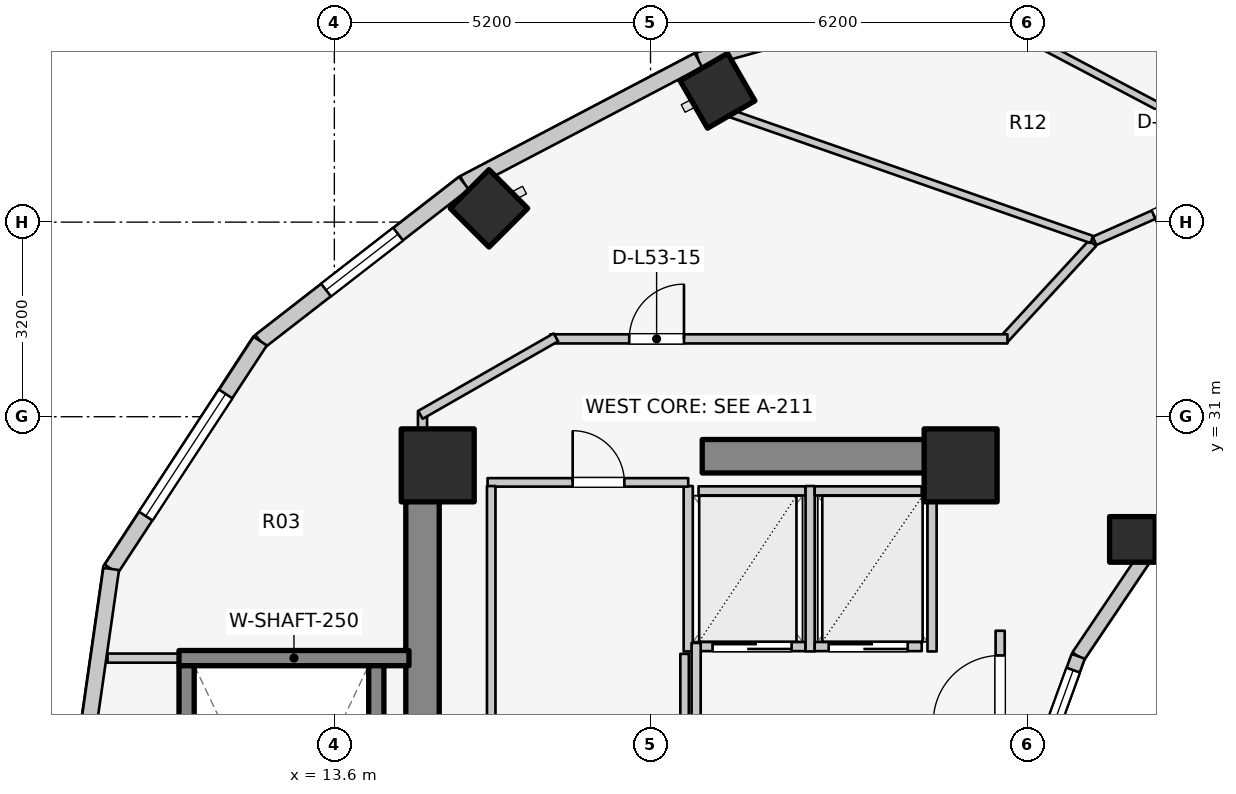
"""IFC4 building model, lengths in metres.
Left out: names, types, materials, properties, quantities, classifications, styles, units other than length and angle.
Written with IfcOpenShell. Run it as: python <this file> out.ifc"""

import sys

from ifc_helpers import new_model, si_unit, direction, frame, frame_2d, origin, origin_2d, place, context, subcontext, project, spatial, rectangle, extrude, element, fill, save


model = new_model("IFC4")
c1 = context("Model", 3, precision=1e-05, world=origin(), true_north=direction((0.0, 1.0)))
c2 = subcontext(c1, "Body", "Model", "MODEL_VIEW")
j1 = project(units=[si_unit("LENGTHUNIT", "METRE"), si_unit("PLANEANGLEUNIT", "RADIAN")], contexts=[c1])
p1 = place(None, origin())
s1 = spatial("IfcSite", under=j1, at=p1, CompositionType="ELEMENT")
p2 = place(p1, origin())
s2 = spatial("IfcBuilding", under=s1, at=p2, CompositionType="ELEMENT")
p3 = place(p2, frame((0.0, 0.0, 174.6)))
s3 = spatial("IfcBuildingStorey", under=s2, at=p3, CompositionType="ELEMENT", Elevation=174.6)
p4 = place(p3, frame((15.05, 17.05, 0.0), z_axis=(0.0, 0.0, 1.0), x_axis=(0.0, 1.0, 0.0)))
e1 = element("IfcWall", 1, at=p4, inside=s3, PredefinedType="SHEAR", context=c2, shape_type="SweptSolid", body=[
    extrude(rectangle(XDim=12.8, YDim=0.55, at=frame_2d((6.4, 0.0))), origin(), (0.0, 0.0, 1.0), 3.1),
])
p5 = place(p3, frame((19.65, 30.35, 0.0), z_axis=(0.0, 0.0, 1.0), x_axis=(1.0, 0.0, 0.0)))
e2 = element("IfcWall", 2, at=p5, inside=s3, PredefinedType="SHEAR", context=c2, shape_type="SweptSolid", body=[
    extrude(rectangle(XDim=4.5, YDim=0.55, at=frame_2d((2.25, 0.0))), origin(), (0.0, 0.0, 1.0), 3.1),
])
p6 = place(p3, frame((11.045, 27.03, 0.0), z_axis=(0.0, 0.0, 1.0), x_axis=(1.0, 0.0, 0.0)))
e3 = element("IfcWall", 3, at=p6, inside=s3, PredefinedType="SOLIDWALL", context=c2, shape_type="SweptSolid", body=[
    extrude(rectangle(XDim=3.782, YDim=0.25, at=frame_2d((1.891, 0.0))), origin(), (0.0, 0.0, 1.0), 3.1),
])
for number, where, z_axis, x_axis in (
    (4, (11.17, 19.095, 0.0), (0.0, 0.0, 1.0), (0.0, 1.0, 0.0)),
    (5, (14.29, 19.095, 0.0), (0.0, 0.0, 1.0), (0.0, 1.0, 0.0)),
):
    element("IfcWall", number, at=place(p3, frame(where, z_axis=z_axis, x_axis=x_axis)), inside=s3, PredefinedType="SOLIDWALL", context=c2, shape_type="SweptSolid", body=[
        extrude(rectangle(XDim=7.81, YDim=0.25, at=frame_2d((3.905, 0.0))), origin(), (0.0, 0.0, 1.0), 3.1),
    ])
for number, where, z_axis, x_axis in (
    (6, (23.9, 30.2, 0.0), (0.0, 0.0, 1.0), (1.0, 0.0, 0.0)),
    (7, (15.3, 30.2, 0.0), (0.0, 0.0, 1.0), (1.0, 0.0, 0.0)),
):
    element("IfcColumn", number, at=place(p3, frame(where, z_axis=z_axis, x_axis=x_axis)), inside=s3, PredefinedType="COLUMN", context=c2, shape_type="SweptSolid", body=[
        extrude(rectangle(XDim=1.2, YDim=1.2, at=origin_2d()), origin(), (0.0, 0.0, 1.0), 3.1),
    ])
p7 = place(p3, frame((19.902, 36.359, 0.0), z_axis=(0.0, 0.0, 1.0), x_axis=(-0.5, 0.866025403784, 0.0)))
e8 = element("IfcColumn", 8, at=p7, inside=s3, PredefinedType="COLUMN", context=c2, shape_type="SweptSolid", body=[
    extrude(rectangle(XDim=0.9, YDim=0.9, at=origin_2d()), origin(), (0.0, 0.0, 1.0), 3.1),
])
p8 = place(p3, frame((26.725, 28.982, 0.0), z_axis=(0.0, 0.0, 1.0), x_axis=(1.0, 0.0, 0.0)))
e9 = element("IfcColumn", 9, at=p8, inside=s3, PredefinedType="COLUMN", context=c2, shape_type="SweptSolid", body=[
    extrude(rectangle(XDim=0.75, YDim=0.75, at=origin_2d()), origin(), (0.0, 0.0, 1.0), 3.1),
])
p9 = place(p3, frame((16.143, 34.427, 0.0), z_axis=(0.0, 0.0, 1.0), x_axis=(-0.707106781187, 0.707106781187, 0.0)))
e10 = element("IfcColumn", 10, at=p9, inside=s3, PredefinedType="COLUMN", context=c2, shape_type="SweptSolid", body=[
    extrude(rectangle(XDim=0.9, YDim=0.9, at=origin_2d()), origin(), (0.0, 0.0, 1.0), 3.1),
])
p10 = place(p3, frame((28.44, 30.032, 0.0), z_axis=(0.0, 0.0, 1.0), x_axis=(-0.752576694707, -0.658504607869, 0.0)))
e11 = element("IfcWall", 11, at=p10, inside=s3, PredefinedType="STANDARD", context=c2, shape_type="SweptSolid", body=[
    extrude(rectangle(XDim=1.959, YDim=0.23, at=frame_2d((0.98, 0.0))), origin(), (0.0, 0.0, 1.0), 2.16),
])
p11 = place(p3, frame((26.965, 28.742, 0.0), z_axis=(0.0, 0.0, 1.0), x_axis=(-0.558197800898, -0.829707909492, 0.0)))
e12 = element("IfcWall", 12, at=p11, inside=s3, PredefinedType="STANDARD", context=c2, shape_type="SweptSolid", body=[
    extrude(rectangle(XDim=2.027, YDim=0.23, at=frame_2d((1.013, 0.0))), origin(), (0.0, 0.0, 1.0), 2.16),
])
p12 = place(p3, frame((25.834, 27.06, 0.0), z_axis=(0.0, 0.0, 1.0), x_axis=(-0.341423187295, -0.93990968033, 0.0)))
e13 = element("IfcWall", 13, at=p12, inside=s3, PredefinedType="STANDARD", context=c2, shape_type="SweptSolid", body=[
    extrude(rectangle(XDim=2.084, YDim=0.23, at=frame_2d((1.042, 0.0))), origin(), (0.0, 0.0, 1.0), 2.84),
])
p13 = place(p12, frame((0.242, 0.0, 0.85)))
e14 = element("IfcOpeningElement", 14, at=p13, cuts=e13, PredefinedType="OPENING", context=c2, shape_type="SweptSolid", body=[
    extrude(rectangle(XDim=1.6, YDim=1.65, at=frame_2d((0.8, 0.825))), frame((0.0, 0.125, 0.0), z_axis=(0.0, -1.0, 0.0), x_axis=(1.0, 0.0, 0.0)), (0.0, 0.0, 1.0), 0.25),
])
p14 = place(p3, frame((24.635, 38.257, 0.0), z_axis=(0.0, 0.0, 1.0), x_axis=(-0.963953455704, -0.26607092144, 0.0)))
e15 = element("IfcWall", 15, at=p14, inside=s3, PredefinedType="STANDARD", context=c2, shape_type="SweptSolid", body=[
    extrude(rectangle(XDim=5.237, YDim=0.26, at=frame_2d((2.618, 0.0))), origin(), (0.0, 0.0, 1.0), 2.85),
])
p15 = place(p14, frame((1.418, 0.0, 0.75)))
e16 = element("IfcOpeningElement", 16, at=p15, cuts=e15, PredefinedType="OPENING", context=c2, shape_type="SweptSolid", body=[
    extrude(rectangle(XDim=2.4, YDim=1.7, at=frame_2d((1.2, 0.85))), frame((0.0, 0.14, 0.0), z_axis=(0.0, -1.0, 0.0), x_axis=(1.0, 0.0, 0.0)), (0.0, 0.0, 1.0), 0.28),
])
p16 = place(p3, frame((19.587, 36.863, 0.0), z_axis=(0.0, 0.0, 1.0), x_axis=(-0.885660265226, -0.464333818065, 0.0)))
e17 = element("IfcWall", 17, at=p16, inside=s3, PredefinedType="STANDARD", context=c2, shape_type="SweptSolid", body=[
    extrude(rectangle(XDim=4.354, YDim=0.26, at=frame_2d((2.177, 0.0))), origin(), (0.0, 0.0, 1.0), 2.85),
])
p17 = place(p3, frame((15.731, 34.842, 0.0), z_axis=(0.0, 0.0, 1.0), x_axis=(-0.790185650662, -0.612867552973, 0.0)))
e18 = element("IfcWall", 18, at=p17, inside=s3, PredefinedType="STANDARD", context=c2, shape_type="SweptSolid", body=[
    extrude(rectangle(XDim=4.239, YDim=0.26, at=frame_2d((2.12, 0.0))), origin(), (0.0, 0.0, 1.0), 2.85),
])
p18 = place(p17, frame((1.37, 0.0, 0.75)))
e19 = element("IfcOpeningElement", 19, at=p18, cuts=e18, PredefinedType="OPENING", context=c2, shape_type="SweptSolid", body=[
    extrude(rectangle(XDim=1.5, YDim=1.6, at=frame_2d((0.75, 0.8))), frame((0.0, 0.14, 0.0), z_axis=(0.0, -1.0, 0.0), x_axis=(1.0, 0.0, 0.0)), (0.0, 0.0, 1.0), 0.28),
])
p19 = place(p3, frame((12.381, 32.243, 0.0), z_axis=(0.0, 0.0, 1.0), x_axis=(-0.547456494366, -0.836834145322, 0.0)))
e20 = element("IfcWall", 20, at=p19, inside=s3, PredefinedType="STANDARD", context=c2, shape_type="SweptSolid", body=[
    extrude(rectangle(XDim=4.477, YDim=0.26, at=frame_2d((2.239, 0.0))), origin(), (0.0, 0.0, 1.0), 2.85),
])
p20 = place(p19, frame((1.039, 0.0, 0.75)))
e21 = element("IfcOpeningElement", 21, at=p20, cuts=e20, PredefinedType="OPENING", context=c2, shape_type="SweptSolid", body=[
    extrude(rectangle(XDim=2.4, YDim=1.7, at=frame_2d((1.2, 0.85))), frame((0.0, 0.14, 0.0), z_axis=(0.0, -1.0, 0.0), x_axis=(1.0, 0.0, 0.0)), (0.0, 0.0, 1.0), 0.28),
])
p21 = place(p3, frame((9.93, 28.497, 0.0), z_axis=(0.0, 0.0, 1.0), x_axis=(-0.142227632286, -0.989833976288, 0.0)))
e22 = element("IfcWall", 22, at=p21, inside=s3, PredefinedType="STANDARD", context=c2, shape_type="SweptSolid", body=[
    extrude(rectangle(XDim=5.553, YDim=0.26, at=frame_2d((2.776, 0.0))), origin(), (0.0, 0.0, 1.0), 2.85),
])
p22 = place(p21, frame((2.892, 0.0, 0.75)))
e23 = element("IfcOpeningElement", 23, at=p22, cuts=e22, PredefinedType="OPENING", context=c2, shape_type="SweptSolid", body=[
    extrude(rectangle(XDim=1.2, YDim=1.5, at=frame_2d((0.6, 0.75))), frame((0.0, 0.14, 0.0), z_axis=(0.0, -1.0, 0.0), x_axis=(1.0, 0.0, 0.0)), (0.0, 0.0, 1.0), 0.28),
])
p23 = place(p3, frame((19.59, 27.22, 0.0), z_axis=(0.0, 0.0, 1.0), x_axis=(1.0, 0.0, 0.0)))
e24 = element("IfcWall", 24, at=p23, inside=s3, PredefinedType="SOLIDWALL", context=c2, shape_type="SweptSolid", body=[
    extrude(rectangle(XDim=1.76, YDim=0.15, at=frame_2d((0.88, 0.0))), origin(), (0.0, 0.0, 1.0), 2.855),
])
p24 = place(p23, frame((0.23, 0.0, 0.0)))
e25 = element("IfcOpeningElement", 25, at=p24, cuts=e24, PredefinedType="OPENING", context=c2, shape_type="SweptSolid", body=[
    extrude(rectangle(XDim=1.3, YDim=2.1, at=frame_2d((0.65, 1.05))), frame((0.0, 0.085, 0.0), z_axis=(0.0, -1.0, 0.0), x_axis=(1.0, 0.0, 0.0)), (0.0, 0.0, 1.0), 0.17),
])
p25 = place(p3, frame((19.59, 29.78, 0.0), z_axis=(0.0, 0.0, 1.0), x_axis=(1.0, 0.0, 0.0)))
e26 = element("IfcWall", 26, at=p25, inside=s3, PredefinedType="SOLIDWALL", context=c2, shape_type="SweptSolid", body=[
    extrude(rectangle(XDim=1.76, YDim=0.15, at=frame_2d((0.88, 0.0))), origin(), (0.0, 0.0, 1.0), 2.855),
])
for number, where, z_axis, x_axis in (
    (27, (19.42, 27.14, 0.0), (0.0, 0.0, 1.0), (0.0, 1.0, 0.0)),
    (28, (21.425, 27.14, 0.0), (0.0, 0.0, 1.0), (0.0, 1.0, 0.0)),
):
    element("IfcWall", number, at=place(p3, frame(where, z_axis=z_axis, x_axis=x_axis)), inside=s3, PredefinedType="SOLIDWALL", context=c2, shape_type="SweptSolid", body=[
        extrude(rectangle(XDim=2.72, YDim=0.15, at=frame_2d((1.36, 0.0))), origin(), (0.0, 0.0, 1.0), 2.855),
    ])
p26 = place(p3, frame((21.5, 27.22, 0.0), z_axis=(0.0, 0.0, 1.0), x_axis=(1.0, 0.0, 0.0)))
e29 = element("IfcWall", 29, at=p26, inside=s3, PredefinedType="SOLIDWALL", context=c2, shape_type="SweptSolid", body=[
    extrude(rectangle(XDim=1.76, YDim=0.15, at=frame_2d((0.88, 0.0))), origin(), (0.0, 0.0, 1.0), 2.855),
])
p27 = place(p26, frame((0.23, 0.0, 0.0)))
e30 = element("IfcOpeningElement", 30, at=p27, cuts=e29, PredefinedType="OPENING", context=c2, shape_type="SweptSolid", body=[
    extrude(rectangle(XDim=1.3, YDim=2.1, at=frame_2d((0.65, 1.05))), frame((0.0, 0.085, 0.0), z_axis=(0.0, -1.0, 0.0), x_axis=(1.0, 0.0, 0.0)), (0.0, 0.0, 1.0), 0.17),
])
p28 = place(p3, frame((21.5, 29.78, 0.0), z_axis=(0.0, 0.0, 1.0), x_axis=(1.0, 0.0, 0.0)))
e31 = element("IfcWall", 31, at=p28, inside=s3, PredefinedType="SOLIDWALL", context=c2, shape_type="SweptSolid", body=[
    extrude(rectangle(XDim=1.76, YDim=0.15, at=frame_2d((0.88, 0.0))), origin(), (0.0, 0.0, 1.0), 2.855),
])
p29 = place(p3, frame((23.43, 27.14, 0.0), z_axis=(0.0, 0.0, 1.0), x_axis=(0.0, 1.0, 0.0)))
e32 = element("IfcWall", 32, at=p29, inside=s3, PredefinedType="SOLIDWALL", context=c2, shape_type="SweptSolid", body=[
    extrude(rectangle(XDim=2.72, YDim=0.15, at=frame_2d((1.36, 0.0))), origin(), (0.0, 0.0, 1.0), 2.855),
])
p30 = place(p3, frame((19.55, 24.08, 0.0), z_axis=(0.0, 0.0, 1.0), x_axis=(0.0, 1.0, 0.0)))
e33 = element("IfcWall", 33, at=p30, inside=s3, PredefinedType="PARTITIONING", context=c2, shape_type="SweptSolid", body=[
    extrude(rectangle(XDim=3.2, YDim=0.15, at=frame_2d((1.6, 0.0))), origin(), (0.0, 0.0, 1.0), 2.855),
])
p31 = place(p3, frame((24.55, 24.08, 0.0), z_axis=(0.0, 0.0, 1.0), x_axis=(0.0, 1.0, 0.0)))
e34 = element("IfcWall", 34, at=p31, inside=s3, PredefinedType="PARTITIONING", context=c2, shape_type="SweptSolid", body=[
    extrude(rectangle(XDim=3.4, YDim=0.15, at=frame_2d((1.7, 0.0))), origin(), (0.0, 0.0, 1.0), 2.855),
])
p32 = place(p31, frame((1.894, 0.0, 0.0)))
e35 = element("IfcOpeningElement", 35, at=p32, cuts=e34, PredefinedType="OPENING", context=c2, shape_type="SweptSolid", body=[
    extrude(rectangle(XDim=1.1, YDim=2.1, at=frame_2d((0.55, 1.05))), frame((0.0, 0.085, 0.0), z_axis=(0.0, -1.0, 0.0), x_axis=(1.0, 0.0, 0.0)), (0.0, 0.0, 1.0), 0.17),
])
p33 = place(p3, frame((16.12, 29.92, 0.0), z_axis=(0.0, 0.0, 1.0), x_axis=(1.0, 0.0, 0.0)))
e36 = element("IfcWall", 36, at=p33, inside=s3, PredefinedType="PLUMBINGWALL", context=c2, shape_type="SweptSolid", body=[
    extrude(rectangle(XDim=3.3, YDim=0.14, at=frame_2d((1.65, 0.0))), origin(), (0.0, 0.0, 1.0), 2.855),
])
p34 = place(p33, frame((1.399, 0.0, 0.0)))
e37 = element("IfcOpeningElement", 37, at=p34, cuts=e36, PredefinedType="OPENING", context=c2, shape_type="SweptSolid", body=[
    extrude(rectangle(XDim=0.85, YDim=2.05, at=frame_2d((0.425, 1.025))), frame((0.0, 0.08, 0.0), z_axis=(0.0, -1.0, 0.0), x_axis=(1.0, 0.0, 0.0)), (0.0, 0.0, 1.0), 0.16),
])
p35 = place(p3, frame((16.18, 25.98, 0.0), z_axis=(0.0, 0.0, 1.0), x_axis=(0.0, 1.0, 0.0)))
e38 = element("IfcWall", 38, at=p35, inside=s3, PredefinedType="PLUMBINGWALL", context=c2, shape_type="SweptSolid", body=[
    extrude(rectangle(XDim=3.88, YDim=0.14, at=frame_2d((1.94, 0.0))), origin(), (0.0, 0.0, 1.0), 2.855),
])
p36 = place(p3, frame((19.36, 25.98, 0.0), z_axis=(0.0, 0.0, 1.0), x_axis=(0.0, 1.0, 0.0)))
e39 = element("IfcWall", 39, at=p36, inside=s3, PredefinedType="PLUMBINGWALL", context=c2, shape_type="SweptSolid", body=[
    extrude(rectangle(XDim=1.12, YDim=0.14, at=frame_2d((0.56, 0.0))), origin(), (0.0, 0.0, 1.0), 2.855),
])
p37 = place(p3, frame((9.87, 27.03, 0.0), z_axis=(0.0, 0.0, 1.0), x_axis=(1.0, 0.0, 0.0)))
e40 = element("IfcWall", 40, at=p37, inside=s3, PredefinedType="PARTITIONING", context=c2, shape_type="SweptSolid", body=[
    extrude(rectangle(XDim=1.17, YDim=0.15, at=frame_2d((0.585, 0.0))), origin(), (0.0, 0.0, 1.0), 2.855),
])
p38 = place(p3, frame((15.05, 29.8, 0.0), z_axis=(0.0, 0.0, 1.0), x_axis=(0.0, 1.0, 0.0)))
e41 = element("IfcWall", 41, at=p38, inside=s3, PredefinedType="PARTITIONING", context=c2, shape_type="SweptSolid", body=[
    extrude(rectangle(XDim=1.29, YDim=0.15, at=frame_2d((0.645, 0.0))), origin(), (0.0, 0.0, 1.0), 2.855),
])
p39 = place(p3, frame((26.072, 33.856, 0.0), z_axis=(0.0, 0.0, 1.0), x_axis=(-0.677579737957, -0.735449317567, 0.0)))
e42 = element("IfcWall", 42, at=p39, inside=s3, PredefinedType="PARTITIONING", context=c2, shape_type="SweptSolid", body=[
    extrude(rectangle(XDim=2.173, YDim=0.15, at=frame_2d((1.086, 0.0))), origin(), (0.0, 0.0, 1.0), 2.299),
])
p40 = place(p3, frame((17.15, 32.28, 0.0), z_axis=(0.0, 0.0, 1.0), x_axis=(1.0, 0.0, 0.0)))
e43 = element("IfcWall", 43, at=p40, inside=s3, PredefinedType="PARTITIONING", context=c2, shape_type="SweptSolid", body=[
    extrude(rectangle(XDim=7.52, YDim=0.15, at=frame_2d((3.76, 0.0))), origin(), (0.0, 0.0, 1.0), 2.299),
])
p41 = place(p40, frame((1.3, 0.0, 0.0)))
e44 = element("IfcOpeningElement", 44, at=p41, cuts=e43, PredefinedType="OPENING", context=c2, shape_type="SweptSolid", body=[
    extrude(rectangle(XDim=0.9, YDim=2.1, at=frame_2d((0.45, 1.05))), frame((0.0, 0.085, 0.0), z_axis=(0.0, -1.0, 0.0), x_axis=(1.0, 0.0, 0.0)), (0.0, 0.0, 1.0), 0.17),
])
p42 = place(p3, frame((17.243, 32.305, 0.0), z_axis=(0.0, 0.0, 1.0), x_axis=(-0.867991349648, -0.496579315857, 0.0)))
e45 = element("IfcWall", 45, at=p42, inside=s3, PredefinedType="PARTITIONING", context=c2, shape_type="SweptSolid", body=[
    extrude(rectangle(XDim=2.567, YDim=0.15, at=frame_2d((1.283, 0.0))), origin(), (0.0, 0.0, 1.0), 2.22),
])
p43 = place(p3, frame((28.902, 35.179, 0.0), z_axis=(0.0, 0.0, 1.0), x_axis=(-0.884576855896, 0.466394453241, 0.0)))
e46 = element("IfcWall", 46, at=p43, inside=s3, PredefinedType="PARTITIONING", context=c2, shape_type="SweptSolid", body=[
    extrude(rectangle(XDim=4.487, YDim=0.125, at=frame_2d((2.243, 0.0))), origin(), (0.0, 0.0, 1.0), 2.299),
])
p44 = place(p3, frame((26.057, 33.914, 0.0), z_axis=(0.0, 0.0, 1.0), x_axis=(-0.944182779284, 0.329422038278, 0.0)))
e47 = element("IfcWall", 47, at=p44, inside=s3, PredefinedType="PARTITIONING", context=c2, shape_type="SweptSolid", body=[
    extrude(rectangle(XDim=6.291, YDim=0.125, at=frame_2d((3.146, 0.0))), origin(), (0.0, 0.0, 1.0), 2.299),
])
p45 = place(p3, frame((28.958, 35.156, 0.0), z_axis=(0.0, 0.0, 1.0), x_axis=(-0.914519212393, -0.40454247016, 0.0)))
e48 = element("IfcWall", 48, at=p45, inside=s3, PredefinedType="PARTITIONING", context=c2, shape_type="SweptSolid", body=[
    extrude(rectangle(XDim=3.124, YDim=0.15, at=frame_2d((1.562, 0.0))), origin(), (0.0, 0.0, 1.0), 2.299),
])
p46 = place(p45, frame((1.062, 0.0, 0.0)))
e49 = element("IfcOpeningElement", 49, at=p46, cuts=e48, PredefinedType="OPENING", context=c2, shape_type="SweptSolid", body=[
    extrude(rectangle(XDim=1.0, YDim=2.1, at=frame_2d((0.5, 1.05))), frame((0.0, 0.085, 0.0), z_axis=(0.0, -1.0, 0.0), x_axis=(1.0, 0.0, 0.0)), (0.0, 0.0, 1.0), 0.17),
])
p47 = place(p13, origin())
e50 = element("IfcWindow", 50, at=p47, inside=s3, PartitioningType="SINGLE_PANEL", PredefinedType="WINDOW", context=c2, shape_type="SweptSolid", body=[
    extrude(rectangle(XDim=1.6, YDim=1.65, at=frame_2d((0.8, 0.825))), frame((0.0, 0.03, 0.0), z_axis=(0.0, -1.0, 0.0), x_axis=(1.0, 0.0, 0.0)), (0.0, 0.0, 1.0), 0.06),
])
fill(e14, e50)
p48 = place(p18, origin())
e51 = element("IfcWindow", 51, at=p48, inside=s3, PartitioningType="SINGLE_PANEL", PredefinedType="WINDOW", context=c2, shape_type="SweptSolid", body=[
    extrude(rectangle(XDim=1.5, YDim=1.6, at=frame_2d((0.75, 0.8))), frame((0.0, 0.03, 0.0), z_axis=(0.0, -1.0, 0.0), x_axis=(1.0, 0.0, 0.0)), (0.0, 0.0, 1.0), 0.06),
])
fill(e19, e51)
p49 = place(p20, origin())
e52 = element("IfcWindow", 52, at=p49, inside=s3, PartitioningType="SINGLE_PANEL", PredefinedType="WINDOW", context=c2, shape_type="SweptSolid", body=[
    extrude(rectangle(XDim=2.4, YDim=1.7, at=frame_2d((1.2, 0.85))), frame((0.0, 0.03, 0.0), z_axis=(0.0, -1.0, 0.0), x_axis=(1.0, 0.0, 0.0)), (0.0, 0.0, 1.0), 0.06),
])
fill(e21, e52)
p50 = place(p24, origin())
e53 = element("IfcDoor", 53, at=p50, inside=s3, OperationType="DOUBLE_DOOR_SLIDING", PredefinedType="DOOR", context=c2, shape_type="SweptSolid", body=[
    extrude(rectangle(XDim=1.3, YDim=2.1, at=frame_2d((0.65, 1.05))), frame((0.0, 0.025, 0.0), z_axis=(0.0, -1.0, 0.0), x_axis=(1.0, 0.0, 0.0)), (0.0, 0.0, 1.0), 0.05),
])
fill(e25, e53)
p51 = place(p27, origin())
e54 = element("IfcDoor", 54, at=p51, inside=s3, OperationType="DOUBLE_DOOR_SLIDING", PredefinedType="DOOR", context=c2, shape_type="SweptSolid", body=[
    extrude(rectangle(XDim=1.3, YDim=2.1, at=frame_2d((0.65, 1.05))), frame((0.0, 0.025, 0.0), z_axis=(0.0, -1.0, 0.0), x_axis=(1.0, 0.0, 0.0)), (0.0, 0.0, 1.0), 0.05),
])
fill(e30, e54)
p52 = place(p32, origin())
e55 = element("IfcDoor", 55, at=p52, inside=s3, OperationType="SINGLE_SWING_LEFT", PredefinedType="DOOR", context=c2, shape_type="SweptSolid", body=[
    extrude(rectangle(XDim=1.1, YDim=2.1, at=frame_2d((0.55, 1.05))), frame((0.0, 0.025, 0.0), z_axis=(0.0, -1.0, 0.0), x_axis=(1.0, 0.0, 0.0)), (0.0, 0.0, 1.0), 0.05),
])
fill(e35, e55)
p53 = place(p34, origin())
e56 = element("IfcDoor", 56, at=p53, inside=s3, OperationType="SINGLE_SWING_LEFT", PredefinedType="DOOR", context=c2, shape_type="SweptSolid", body=[
    extrude(rectangle(XDim=0.85, YDim=2.05, at=frame_2d((0.425, 1.025))), frame((0.0, 0.025, 0.0), z_axis=(0.0, -1.0, 0.0), x_axis=(1.0, 0.0, 0.0)), (0.0, 0.0, 1.0), 0.05),
])
fill(e37, e56)
p54 = place(p41, origin())
e57 = element("IfcDoor", 57, at=p54, inside=s3, OperationType="SINGLE_SWING_RIGHT", PredefinedType="DOOR", context=c2, shape_type="SweptSolid", body=[
    extrude(rectangle(XDim=0.9, YDim=2.1, at=frame_2d((0.45, 1.05))), frame((0.0, 0.025, 0.0), z_axis=(0.0, -1.0, 0.0), x_axis=(1.0, 0.0, 0.0)), (0.0, 0.0, 1.0), 0.05),
])
fill(e44, e57)
p55 = place(p46, origin())
e58 = element("IfcDoor", 58, at=p55, inside=s3, OperationType="SINGLE_SWING_RIGHT", PredefinedType="DOOR", context=c2, shape_type="SweptSolid", body=[
    extrude(rectangle(XDim=1.0, YDim=2.1, at=frame_2d((0.5, 1.05))), frame((0.0, 0.025, 0.0), z_axis=(0.0, -1.0, 0.0), x_axis=(1.0, 0.0, 0.0)), (0.0, 0.0, 1.0), 0.05),
])
fill(e49, e58)
save(model, sys.argv[1])
